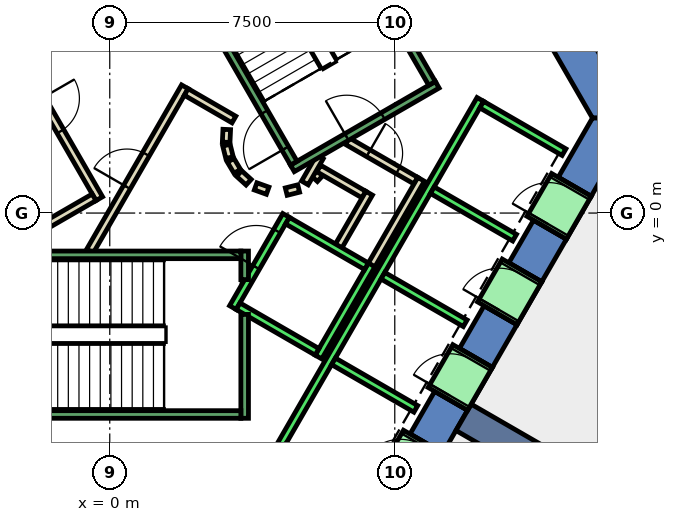
"""IFC4 building model, lengths in metres.
Left out: names, types, materials, properties, quantities, classifications, styles, units other than length and angle.
Written with IfcOpenShell. Run it as: python <this file> out.ifc"""

import sys

from ifc_helpers import new_model, si_unit, direction, frame, frame_2d, origin, place, context, subcontext, project, spatial, polyline, rectangle, outline, extrude, element, fill, save


model = new_model("IFC4")
c1 = context("Model", 3, precision=1e-05, world=origin(), true_north=direction((0.0, 1.0)))
c2 = subcontext(c1, "Body", "Model", "MODEL_VIEW")
j1 = project(units=[si_unit("LENGTHUNIT", "METRE"), si_unit("PLANEANGLEUNIT", "RADIAN")], contexts=[c1])
p1 = place(None, origin())
s1 = spatial("IfcSite", under=j1, at=p1, CompositionType="ELEMENT")
p2 = place(p1, origin())
s2 = spatial("IfcBuilding", under=s1, at=p2, CompositionType="ELEMENT")
p3 = place(p2, frame((0.0, 0.0, 64.4)))
s3 = spatial("IfcBuildingStorey", under=s2, at=p3, CompositionType="ELEMENT", Elevation=64.4)
p4 = place(p3, frame((0.0, 0.0, -0.4)))
e1 = element("IfcWall", 1, at=p4, inside=s3, PredefinedType="SHEAR", context=c2, shape_type="SweptSolid", body=[
    extrude(outline(polyline([(8.517, 11.748), (7.651, 11.248), (12.702, 2.5), (13.856, 2.5), (8.517, 11.748)])), origin(), (0.0, 0.0, 1.0), 4.2),
])
p5 = place(p3, frame((0.0, 0.0, -0.4)))
e2 = element("IfcWall", 2, at=p5, inside=s3, PredefinedType="SHEAR", context=c2, shape_type="SweptSolid", body=[
    extrude(outline(polyline([(9.417, -5.189), (8.551, -4.689), (7.902, -5.814), (8.767, -6.314), (9.417, -5.189)])), origin(), (0.0, 0.0, 1.0), 4.2),
])
p6 = place(p3, frame((0.0, 0.0, -0.4)))
e3 = element("IfcWall", 3, at=p6, inside=s3, PredefinedType="SHEAR", context=c2, shape_type="SweptSolid", body=[
    extrude(outline(polyline([(10.717, -2.937), (9.851, -2.437), (9.201, -3.563), (10.067, -4.063), (10.717, -2.937)])), origin(), (0.0, 0.0, 1.0), 4.2),
])
p7 = place(p3, frame((0.0, 0.0, -0.4)))
e4 = element("IfcWall", 4, at=p7, inside=s3, PredefinedType="SHEAR", context=c2, shape_type="SweptSolid", body=[
    extrude(outline(polyline([(12.017, -0.686), (11.151, -0.186), (10.501, -1.311), (11.367, -1.811), (12.017, -0.686)])), origin(), (0.0, 0.0, 1.0), 4.2),
])
p8 = place(p3, frame((0.0, 0.0, -0.4)))
e5 = element("IfcWall", 5, at=p8, inside=s3, PredefinedType="SHEAR", context=c2, shape_type="SweptSolid", body=[
    extrude(outline(polyline([(11.801, 0.94), (12.667, 0.44), (13.856, 2.5), (12.702, 2.5), (11.801, 0.94)])), origin(), (0.0, 0.0, 1.0), 4.2),
])
p9 = place(p3, frame((0.0, 0.0, 3.6)))
e6 = element("IfcWall", 6, at=p9, inside=s3, PredefinedType="SHEAR", context=c2, shape_type="SweptSolid", body=[
    extrude(outline(polyline([(8.767, -6.314), (7.902, -5.814), (7.252, -6.94), (8.117, -7.44), (8.767, -6.314)])), origin(), (0.0, 0.0, 1.0), 0.2),
])
p10 = place(p3, frame((0.0, 0.0, 3.6)))
e7 = element("IfcWall", 7, at=p10, inside=s3, PredefinedType="SHEAR", context=c2, shape_type="SweptSolid", body=[
    extrude(outline(polyline([(10.067, -4.063), (9.201, -3.563), (8.551, -4.689), (9.417, -5.189), (10.067, -4.063)])), origin(), (0.0, 0.0, 1.0), 0.2),
])
p11 = place(p3, frame((0.0, 0.0, 3.6)))
e8 = element("IfcWall", 8, at=p11, inside=s3, PredefinedType="SHEAR", context=c2, shape_type="SweptSolid", body=[
    extrude(outline(polyline([(11.367, -1.811), (10.501, -1.311), (9.851, -2.437), (10.717, -2.937), (11.367, -1.811)])), origin(), (0.0, 0.0, 1.0), 0.2),
])
p12 = place(p3, frame((0.0, 0.0, 3.6)))
e9 = element("IfcWall", 9, at=p12, inside=s3, PredefinedType="SHEAR", context=c2, shape_type="SweptSolid", body=[
    extrude(outline(polyline([(12.667, 0.44), (11.801, 0.94), (11.151, -0.186), (12.017, -0.686), (12.667, 0.44)])), origin(), (0.0, 0.0, 1.0), 0.2),
])
p13 = place(p3, frame((9.31, -5.375, -0.4), z_axis=(0.0, 0.0, 1.0), x_axis=(0.866017533419, -0.500013631625, 0.0)))
e10 = element("IfcWall", 10, at=p13, inside=s3, PredefinedType="SHEAR", context=c2, shape_type="SweptSolid", body=[
    extrude(rectangle(XDim=9.0, YDim=0.8, at=frame_2d((4.5, 0.0))), origin(), (0.0, 0.0, 1.0), 4.2),
])
p14 = place(p3, frame((5.39, 0.898, 0.0), z_axis=(0.0, 0.0, 1.0), x_axis=(0.673828488714, 0.738887791073, 0.0)))
e11 = element("IfcWall", 11, at=p14, inside=s3, PredefinedType="PARTITIONING", context=c2, shape_type="SweptSolid", body=[
    extrude(rectangle(XDim=0.263, YDim=0.2, at=frame_2d((0.131, 0.0))), origin(), (0.0, 0.0, 1.0), 3.8),
])
p15 = place(p3, frame((5.499, 1.172, 0.0), z_axis=(0.0, 0.0, 1.0), x_axis=(0.866333505267, -0.499465972466, 0.0)))
e12 = element("IfcWall", 12, at=p15, inside=s3, PredefinedType="PARTITIONING", context=c2, shape_type="SweptSolid", body=[
    extrude(rectangle(XDim=1.374, YDim=0.2, at=frame_2d((0.687, 0.0))), origin(), (0.0, 0.0, 1.0), 3.8),
])
p16 = place(p3, frame((6.826, 0.522, 0.0), z_axis=(0.0, 0.0, 1.0), x_axis=(-0.500016722714, -0.866015748706, 0.0)))
e13 = element("IfcWall", 13, at=p16, inside=s3, PredefinedType="PARTITIONING", context=c2, shape_type="SweptSolid", body=[
    extrude(rectangle(XDim=1.7, YDim=0.2, at=frame_2d((0.85, 0.0))), origin(), (0.0, 0.0, 1.0), 3.8),
])
p17 = place(p3, frame((6.25, 1.894, 0.0), z_axis=(0.0, 0.0, 1.0), x_axis=(0.866043184279, -0.499969202016, 0.0)))
e14 = element("IfcWall", 14, at=p17, inside=s3, PredefinedType="PARTITIONING", context=c2, shape_type="SweptSolid", body=[
    extrude(rectangle(XDim=2.084, YDim=0.2, at=frame_2d((1.042, 0.0))), origin(), (0.0, 0.0, 1.0), 3.8),
])
p18 = place(p17, frame((0.642, 0.0, 0.0)))
e15 = element("IfcOpeningElement", 15, at=p18, cuts=e14, PredefinedType="OPENING", context=c2, shape_type="SweptSolid", body=[
    extrude(rectangle(XDim=0.9, YDim=2.1, at=frame_2d((0.45, 1.05))), frame((0.0, 0.11, 0.0), z_axis=(0.0, -1.0, 0.0), x_axis=(1.0, 0.0, 0.0)), (0.0, 0.0, 1.0), 0.22),
])
p19 = place(p3, frame((8.192, 0.888, 0.0), z_axis=(0.0, 0.0, 1.0), x_axis=(-0.499940625693, -0.866059680843, 0.0)))
e16 = element("IfcWall", 16, at=p19, inside=s3, PredefinedType="PARTITIONING", context=c2, shape_type="SweptSolid", body=[
    extrude(rectangle(XDim=2.68, YDim=0.2, at=frame_2d((1.34, 0.0))), origin(), (0.0, 0.0, 1.0), 3.8),
])
p20 = place(p3, frame((5.135, 0.793, 0.0), z_axis=(0.0, 0.0, 1.0), x_axis=(0.499526442893, 0.866298639529, 0.0)))
e17 = element("IfcWall", 17, at=p20, inside=s3, PredefinedType="PARTITIONING", context=c2, shape_type="SweptSolid", body=[
    extrude(rectangle(XDim=0.791, YDim=0.2, at=frame_2d((0.396, 0.0))), origin(), (0.0, 0.0, 1.0), 3.8),
])
p21 = place(p3, frame((-0.52, -1.0, 0.0), z_axis=(0.0, 0.0, 1.0), x_axis=(0.50011622646, 0.865958290007, 0.0)))
e18 = element("IfcWall", 18, at=p21, inside=s3, PredefinedType="PARTITIONING", context=c2, shape_type="SweptSolid", body=[
    extrude(rectangle(XDim=4.991, YDim=0.2, at=frame_2d((2.496, 0.0))), origin(), (0.0, 0.0, 1.0), 3.8),
])
p22 = place(p21, frame((1.945, 0.0, 0.0)))
e19 = element("IfcOpeningElement", 19, at=p22, cuts=e18, PredefinedType="OPENING", context=c2, shape_type="SweptSolid", body=[
    extrude(rectangle(XDim=1.0, YDim=2.1, at=frame_2d((0.5, 1.05))), frame((0.0, 0.11, 0.0), z_axis=(0.0, -1.0, 0.0), x_axis=(1.0, 0.0, 0.0)), (0.0, 0.0, 1.0), 0.22),
])
p23 = place(p3, frame((2.012, 3.186, 0.0), z_axis=(0.0, 0.0, 1.0), x_axis=(0.865891012941, -0.500232699559, 0.0)))
e20 = element("IfcWall", 20, at=p23, inside=s3, PredefinedType="PARTITIONING", context=c2, shape_type="SweptSolid", body=[
    extrude(rectangle(XDim=1.449, YDim=0.2, at=frame_2d((0.725, 0.0))), origin(), (0.0, 0.0, 1.0), 3.8),
])
p24 = place(p3, frame((3.079, 2.199, 0.0), z_axis=(0.0, 0.0, 1.0), x_axis=(-0.047771483479, -0.998858290933, 0.0)))
e21 = element("IfcWall", 21, at=p24, inside=s3, PredefinedType="PARTITIONING", context=c2, shape_type="SweptSolid", body=[
    extrude(rectangle(XDim=0.337, YDim=0.2, at=frame_2d((0.169, 0.0))), origin(), (0.0, 0.0, 1.0), 3.8),
])
p25 = place(p3, frame((3.07, 1.786, 0.0), z_axis=(0.0, 0.0, 1.0), x_axis=(0.242705583207, -0.970099994784, 0.0)))
e22 = element("IfcWall", 22, at=p25, inside=s3, PredefinedType="PARTITIONING", context=c2, shape_type="SweptSolid", body=[
    extrude(rectangle(XDim=0.338, YDim=0.2, at=frame_2d((0.169, 0.0))), origin(), (0.0, 0.0, 1.0), 3.8),
])
for number, where, z_axis, x_axis in (
    (23, (3.182, 1.388, 0.0), (0.0, 0.0, 1.0), (0.512, -0.859, 0.0)),
    (24, (3.404, 1.039, 0.0), (0.0, 0.0, 1.0), (0.74, -0.672, 0.0)),
):
    element("IfcWall", number, at=place(p3, frame(where, z_axis=z_axis, x_axis=x_axis)), inside=s3, PredefinedType="PARTITIONING", context=c2, shape_type="SweptSolid", body=[
        extrude(rectangle(XDim=0.338, YDim=0.2, at=frame_2d((0.169, 0.0))), origin(), (0.0, 0.0, 1.0), 3.8),
    ])
p26 = place(p3, frame((3.838, 0.702, 0.0), z_axis=(0.0, 0.0, 1.0), x_axis=(0.941035081519, -0.338308993895, 0.0)))
e25 = element("IfcWall", 25, at=p26, inside=s3, PredefinedType="PARTITIONING", context=c2, shape_type="SweptSolid", body=[
    extrude(rectangle(XDim=0.337, YDim=0.2, at=frame_2d((0.168, 0.0))), origin(), (0.0, 0.0, 1.0), 3.8),
])
p27 = place(p3, frame((4.644, 0.564, 0.0), z_axis=(0.0, 0.0, 1.0), x_axis=(0.969929076366, 0.243387729394, 0.0)))
e26 = element("IfcWall", 26, at=p27, inside=s3, PredefinedType="PARTITIONING", context=c2, shape_type="SweptSolid", body=[
    extrude(rectangle(XDim=0.337, YDim=0.2, at=frame_2d((0.168, 0.0))), origin(), (0.0, 0.0, 1.0), 3.8),
])
p28 = place(p3, frame((-2.771, 4.7, 0.0), z_axis=(0.0, 0.0, 1.0), x_axis=(0.499969479948, -0.866043023828, 0.0)))
e27 = element("IfcWall", 27, at=p28, inside=s3, PredefinedType="PARTITIONING", context=c2, shape_type="SweptSolid", body=[
    extrude(rectangle(XDim=4.99, YDim=0.2, at=frame_2d((2.495, 0.0))), origin(), (0.0, 0.0, 1.0), 3.8),
])
p29 = place(p28, frame((1.945, 0.0, 0.0)))
e28 = element("IfcOpeningElement", 28, at=p29, cuts=e27, PredefinedType="OPENING", context=c2, shape_type="SweptSolid", body=[
    extrude(rectangle(XDim=1.0, YDim=2.1, at=frame_2d((0.5, 1.05))), frame((0.0, 0.11, 0.0), z_axis=(0.0, -1.0, 0.0), x_axis=(1.0, 0.0, 0.0)), (0.0, 0.0, 1.0), 0.22),
])
p30 = place(p3, frame((-0.412, 0.414, 0.0), z_axis=(0.0, 0.0, 1.0), x_axis=(-0.866017369001, -0.500013916395, 0.0)))
e29 = element("IfcWall", 29, at=p30, inside=s3, PredefinedType="PARTITIONING", context=c2, shape_type="SweptSolid", body=[
    extrude(rectangle(XDim=1.45, YDim=0.2, at=frame_2d((0.725, 0.0))), origin(), (0.0, 0.0, 1.0), 3.8),
])
p31 = place(p3, frame((19.81, 5.211, 0.0), z_axis=(0.0, 0.0, 1.0), x_axis=(-0.500003368273, -0.866023459102, 0.0)))
e30 = element("IfcWall", 30, at=p31, inside=s3, PredefinedType="PARTITIONING", context=c2, shape_type="SweptSolid", body=[
    extrude(rectangle(XDim=14.018, YDim=0.2, at=frame_2d((7.009, 0.0))), origin(), (0.0, 0.0, 1.0), 3.8),
])
p32 = place(p3, frame((3.24, -2.488, 0.0), z_axis=(0.0, 0.0, 1.0), x_axis=(0.49994636267, 0.866056369097, 0.0)))
e31 = element("IfcWall", 31, at=p32, inside=s3, PredefinedType="STANDARD", context=c2, shape_type="SweptSolid", body=[
    extrude(rectangle(XDim=2.8, YDim=0.2, at=frame_2d((1.4, 0.0))), origin(), (0.0, 0.0, 1.0), 3.8),
])
p33 = place(p32, frame((1.225, 0.0, 0.0)))
e32 = element("IfcOpeningElement", 32, at=p33, cuts=e31, PredefinedType="OPENING", context=c2, shape_type="SweptSolid", body=[
    extrude(rectangle(XDim=1.1, YDim=2.1, at=frame_2d((0.55, 1.05))), frame((0.0, 0.11, 0.0), z_axis=(0.0, -1.0, 0.0), x_axis=(1.0, 0.0, 0.0)), (0.0, 0.0, 1.0), 0.22),
])
p34 = place(p3, frame((5.492, -3.788, 0.0), z_axis=(0.0, 0.0, 1.0), x_axis=(0.500011755427, 0.866018616679, 0.0)))
e33 = element("IfcWall", 33, at=p34, inside=s3, PredefinedType="STANDARD", context=c2, shape_type="SweptSolid", body=[
    extrude(rectangle(XDim=2.8, YDim=0.2, at=frame_2d((1.4, 0.0))), origin(), (0.0, 0.0, 1.0), 3.8),
])
p35 = place(p3, frame((3.377, -2.452, 0.0), z_axis=(0.0, 0.0, 1.0), x_axis=(0.865955154139, -0.50012165622, 0.0)))
e34 = element("IfcWall", 34, at=p35, inside=s3, PredefinedType="STANDARD", context=c2, shape_type="SweptSolid", body=[
    extrude(rectangle(XDim=2.4, YDim=0.2, at=frame_2d((1.2, 0.0))), origin(), (0.0, 0.0, 1.0), 3.8),
])
p36 = place(p3, frame((4.677, -0.2, 0.0), z_axis=(0.0, 0.0, 1.0), x_axis=(0.865973769406, -0.500089422704, 0.0)))
e35 = element("IfcWall", 35, at=p36, inside=s3, PredefinedType="STANDARD", context=c2, shape_type="SweptSolid", body=[
    extrude(rectangle(XDim=2.399, YDim=0.2, at=frame_2d((1.2, 0.0))), origin(), (0.0, 0.0, 1.0), 3.8),
])
p37 = place(p3, frame((4.451, -6.19, 0.0), z_axis=(0.0, 0.0, 1.0), x_axis=(0.50000090737, 0.866024879913, 0.0)))
e36 = element("IfcWall", 36, at=p37, inside=s3, PredefinedType="STANDARD", context=c2, shape_type="SweptSolid", body=[
    extrude(rectangle(XDim=10.6, YDim=0.2, at=frame_2d((5.3, 0.0))), origin(), (0.0, 0.0, 1.0), 3.8),
])
for number, where, z_axis, x_axis in (
    (37, (5.888, -3.902, 0.0), (0.0, 0.0, 1.0), (0.866, -0.5, 0.0)),
    (38, (7.188, -1.65, 0.0), (0.0, 0.0, 1.0), (0.866, -0.5, 0.0)),
    (39, (8.488, 0.602, 0.0), (0.0, 0.0, 1.0), (0.866, -0.5, 0.0)),
):
    element("IfcWall", number, at=place(p3, frame(where, z_axis=z_axis, x_axis=x_axis)), inside=s3, PredefinedType="STANDARD", context=c2, shape_type="SweptSolid", body=[
        extrude(rectangle(XDim=2.5, YDim=0.2, at=frame_2d((1.25, 0.0))), origin(), (0.0, 0.0, 1.0), 3.8),
    ])
p38 = place(p3, frame((9.788, 2.853, 0.0), z_axis=(0.0, 0.0, 1.0), x_axis=(0.865998541277, -0.500046524342, 0.0)))
e40 = element("IfcWall", 40, at=p38, inside=s3, PredefinedType="STANDARD", context=c2, shape_type="SweptSolid", body=[
    extrude(rectangle(XDim=2.5, YDim=0.2, at=frame_2d((1.25, 0.0))), origin(), (0.0, 0.0, 1.0), 3.8),
])
p39 = place(p3, frame((7.598, -7.14, 0.0), z_axis=(0.0, 0.0, 1.0), x_axis=(0.500362116554, 0.865816234728, 0.0)))
e41 = element("IfcWall", 41, at=p39, inside=s3, PredefinedType="STANDARD", context=c2, shape_type="SweptSolid", body=[
    extrude(rectangle(XDim=1.299, YDim=1.2, at=frame_2d((0.65, 0.0))), origin(), (0.0, 0.0, 1.0), 2.4),
])
p40 = place(p39, frame((0.1, 0.0, 0.0)))
e42 = element("IfcOpeningElement", 42, at=p40, cuts=e41, PredefinedType="OPENING", context=c2, shape_type="SweptSolid", body=[
    extrude(rectangle(XDim=1.1, YDim=2.3, at=frame_2d((0.55, 1.15))), frame((0.0, 0.61, 0.0), z_axis=(0.0, -1.0, 0.0), x_axis=(1.0, 0.0, 0.0)), (0.0, 0.0, 1.0), 1.22),
])
p41 = place(p3, frame((8.898, -4.889, 0.0), z_axis=(0.0, 0.0, 1.0), x_axis=(0.500036693733, 0.866004217611, 0.0)))
e43 = element("IfcWall", 43, at=p41, inside=s3, PredefinedType="STANDARD", context=c2, shape_type="SweptSolid", body=[
    extrude(rectangle(XDim=1.3, YDim=1.2, at=frame_2d((0.65, 0.0))), origin(), (0.0, 0.0, 1.0), 2.4),
])
p42 = place(p41, frame((0.1, 0.0, 0.0)))
e44 = element("IfcOpeningElement", 44, at=p42, cuts=e43, PredefinedType="OPENING", context=c2, shape_type="SweptSolid", body=[
    extrude(rectangle(XDim=1.1, YDim=2.3, at=frame_2d((0.55, 1.15))), frame((0.0, 0.61, 0.0), z_axis=(0.0, -1.0, 0.0), x_axis=(1.0, 0.0, 0.0)), (0.0, 0.0, 1.0), 1.22),
])
p43 = place(p3, frame((10.198, -2.637, 0.0), z_axis=(0.0, 0.0, 1.0), x_axis=(0.49989585183, 0.866085525409, 0.0)))
e45 = element("IfcWall", 45, at=p43, inside=s3, PredefinedType="STANDARD", context=c2, shape_type="SweptSolid", body=[
    extrude(rectangle(XDim=1.3, YDim=1.2, at=frame_2d((0.65, 0.0))), origin(), (0.0, 0.0, 1.0), 2.4),
])
p44 = place(p43, frame((0.1, 0.0, 0.0)))
e46 = element("IfcOpeningElement", 46, at=p44, cuts=e45, PredefinedType="OPENING", context=c2, shape_type="SweptSolid", body=[
    extrude(rectangle(XDim=1.1, YDim=2.3, at=frame_2d((0.55, 1.15))), frame((0.0, 0.61, 0.0), z_axis=(0.0, -1.0, 0.0), x_axis=(1.0, 0.0, 0.0)), (0.0, 0.0, 1.0), 1.22),
])
p45 = place(p3, frame((11.498, -0.385, 0.0), z_axis=(0.0, 0.0, 1.0), x_axis=(0.500221244143, 0.865897630733, 0.0)))
e47 = element("IfcWall", 47, at=p45, inside=s3, PredefinedType="STANDARD", context=c2, shape_type="SweptSolid", body=[
    extrude(rectangle(XDim=1.299, YDim=1.2, at=frame_2d((0.65, 0.0))), origin(), (0.0, 0.0, 1.0), 2.4),
])
p46 = place(p45, frame((0.1, 0.0, 0.0)))
e48 = element("IfcOpeningElement", 48, at=p46, cuts=e47, PredefinedType="OPENING", context=c2, shape_type="SweptSolid", body=[
    extrude(rectangle(XDim=1.1, YDim=2.3, at=frame_2d((0.55, 1.15))), frame((0.0, 0.61, 0.0), z_axis=(0.0, -1.0, 0.0), x_axis=(1.0, 0.0, 0.0)), (0.0, 0.0, 1.0), 1.22),
])
p47 = place(p3, frame((3.55, -2.667, 0.0), z_axis=(0.0, 0.0, 1.0), x_axis=(0.0, -1.0, 0.0)))
e49 = element("IfcWall", 49, at=p47, inside=s3, PredefinedType="STANDARD", context=c2, shape_type="SweptSolid", body=[
    extrude(rectangle(XDim=2.733, YDim=0.2, at=frame_2d((1.366, 0.0))), origin(), (0.0, 0.0, 1.0), 3.8),
])
p48 = place(p3, frame((3.55, -1.0, 0.0), z_axis=(0.0, 0.0, 1.0), x_axis=(0.0, -1.0, 0.0)))
e50 = element("IfcWall", 50, at=p48, inside=s3, PredefinedType="STANDARD", context=c2, shape_type="SweptSolid", body=[
    extrude(rectangle(XDim=0.751, YDim=0.2, at=frame_2d((0.375, 0.0))), origin(), (0.0, 0.0, 1.0), 3.8),
])
p49 = place(p3, frame((-3.45, -1.1, 0.0), z_axis=(0.0, 0.0, 1.0), x_axis=(1.0, 0.0, 0.0)))
e51 = element("IfcWall", 51, at=p49, inside=s3, PredefinedType="STANDARD", context=c2, shape_type="SweptSolid", body=[
    extrude(rectangle(XDim=6.9, YDim=0.2, at=frame_2d((3.45, 0.0))), origin(), (0.0, 0.0, 1.0), 3.8),
])
p50 = place(p49, frame((0.45, 0.0, 0.0)))
e52 = element("IfcOpeningElement", 52, at=p50, cuts=e51, PredefinedType="OPENING", context=c2, shape_type="SweptSolid", body=[
    extrude(rectangle(XDim=1.1, YDim=2.2, at=frame_2d((0.55, 1.1))), frame((0.0, 0.11, 0.0), z_axis=(0.0, -1.0, 0.0), x_axis=(1.0, 0.0, 0.0)), (0.0, 0.0, 1.0), 0.22),
])
p51 = place(p3, frame((-3.45, -5.3, 0.0), z_axis=(0.0, 0.0, 1.0), x_axis=(1.0, 0.0, 0.0)))
e53 = element("IfcWall", 53, at=p51, inside=s3, PredefinedType="STANDARD", context=c2, shape_type="SweptSolid", body=[
    extrude(rectangle(XDim=6.9, YDim=0.2, at=frame_2d((3.45, 0.0))), origin(), (0.0, 0.0, 1.0), 3.8),
])
p52 = place(p3, frame((4.806, 1.176, 0.0), z_axis=(0.0, 0.0, 1.0), x_axis=(0.866059941101, 0.499940174841, 0.0)))
e54 = element("IfcWall", 54, at=p52, inside=s3, PredefinedType="STANDARD", context=c2, shape_type="SweptSolid", body=[
    extrude(rectangle(XDim=4.4, YDim=0.2, at=frame_2d((2.2, 0.0))), origin(), (0.0, 0.0, 1.0), 3.8),
])
p53 = place(p52, frame((1.65, 0.0, 0.0)))
e55 = element("IfcOpeningElement", 55, at=p53, cuts=e54, PredefinedType="OPENING", context=c2, shape_type="SweptSolid", body=[
    extrude(rectangle(XDim=1.1, YDim=2.2, at=frame_2d((0.55, 1.1))), frame((0.0, 0.11, 0.0), z_axis=(0.0, -1.0, 0.0), x_axis=(1.0, 0.0, 0.0)), (0.0, 0.0, 1.0), 0.22),
])
p54 = place(p3, frame((4.843, 1.312, 0.0), z_axis=(0.0, 0.0, 1.0), x_axis=(-0.499963383562, 0.866046543262, 0.0)))
e56 = element("IfcWall", 56, at=p54, inside=s3, PredefinedType="STANDARD", context=c2, shape_type="SweptSolid", body=[
    extrude(rectangle(XDim=6.9, YDim=0.2, at=frame_2d((3.45, 0.0))), origin(), (0.0, 0.0, 1.0), 3.8),
])
p55 = place(p54, frame((0.45, 0.0, 0.0)))
e57 = element("IfcOpeningElement", 57, at=p55, cuts=e56, PredefinedType="OPENING", context=c2, shape_type="SweptSolid", body=[
    extrude(rectangle(XDim=1.1, YDim=2.2, at=frame_2d((0.55, 1.1))), frame((0.0, 0.11, 0.0), z_axis=(0.0, -1.0, 0.0), x_axis=(1.0, 0.0, 0.0)), (0.0, 0.0, 1.0), 0.22),
])
p56 = place(p3, frame((8.48, 3.412, 0.0), z_axis=(0.0, 0.0, 1.0), x_axis=(-0.499978703459, 0.866037698999, 0.0)))
e58 = element("IfcWall", 58, at=p56, inside=s3, PredefinedType="STANDARD", context=c2, shape_type="SweptSolid", body=[
    extrude(rectangle(XDim=6.9, YDim=0.2, at=frame_2d((3.45, 0.0))), origin(), (0.0, 0.0, 1.0), 3.8),
])
p57 = place(p3, frame((-1.393, 7.288, 0.0), z_axis=(0.0, 0.0, 1.0), x_axis=(-0.499963383562, -0.866046543262, 0.0)))
e59 = element("IfcWall", 59, at=p57, inside=s3, PredefinedType="STANDARD", context=c2, shape_type="SweptSolid", body=[
    extrude(rectangle(XDim=6.9, YDim=0.2, at=frame_2d((3.45, 0.0))), origin(), (0.0, 0.0, 1.0), 3.8),
])
p58 = place(p57, frame((0.45, 0.0, 0.0)))
e60 = element("IfcOpeningElement", 60, at=p58, cuts=e59, PredefinedType="OPENING", context=c2, shape_type="SweptSolid", body=[
    extrude(rectangle(XDim=1.1, YDim=2.2, at=frame_2d((0.55, 1.1))), frame((0.0, 0.11, 0.0), z_axis=(0.0, -1.0, 0.0), x_axis=(1.0, 0.0, 0.0)), (0.0, 0.0, 1.0), 0.22),
])
p59 = place(p22, origin())
e61 = element("IfcDoor", 61, at=p59, inside=s3, OperationType="SINGLE_SWING_LEFT", PredefinedType="DOOR", context=c2, shape_type="SweptSolid", body=[
    extrude(rectangle(XDim=1.0, YDim=2.1, at=frame_2d((0.5, 1.05))), frame((0.0, 0.025, 0.0), z_axis=(0.0, -1.0, 0.0), x_axis=(1.0, 0.0, 0.0)), (0.0, 0.0, 1.0), 0.05),
])
fill(e19, e61)
p60 = place(p29, origin())
e62 = element("IfcDoor", 62, at=p60, inside=s3, OperationType="SINGLE_SWING_RIGHT", PredefinedType="DOOR", context=c2, shape_type="SweptSolid", body=[
    extrude(rectangle(XDim=1.0, YDim=2.1, at=frame_2d((0.5, 1.05))), frame((0.0, 0.025, 0.0), z_axis=(0.0, -1.0, 0.0), x_axis=(1.0, 0.0, 0.0)), (0.0, 0.0, 1.0), 0.05),
])
fill(e28, e62)
p61 = place(p18, origin())
e63 = element("IfcDoor", 63, at=p61, inside=s3, OperationType="SINGLE_SWING_LEFT", PredefinedType="DOOR", context=c2, shape_type="SweptSolid", body=[
    extrude(rectangle(XDim=0.9, YDim=2.1, at=frame_2d((0.45, 1.05))), frame((0.0, 0.025, 0.0), z_axis=(0.0, -1.0, 0.0), x_axis=(1.0, 0.0, 0.0)), (0.0, 0.0, 1.0), 0.05),
])
fill(e15, e63)
p62 = place(p42, origin())
e64 = element("IfcDoor", 64, at=p62, inside=s3, OperationType="SLIDING_TO_LEFT", PredefinedType="DOOR", context=c2, shape_type="SweptSolid", body=[
    extrude(rectangle(XDim=1.1, YDim=2.3, at=frame_2d((0.55, 1.15))), frame((0.0, 0.025, 0.0), z_axis=(0.0, -1.0, 0.0), x_axis=(1.0, 0.0, 0.0)), (0.0, 0.0, 1.0), 0.05),
])
fill(e44, e64)
p63 = place(p44, origin())
e65 = element("IfcDoor", 65, at=p63, inside=s3, OperationType="SLIDING_TO_LEFT", PredefinedType="DOOR", context=c2, shape_type="SweptSolid", body=[
    extrude(rectangle(XDim=1.1, YDim=2.3, at=frame_2d((0.55, 1.15))), frame((0.0, 0.025, 0.0), z_axis=(0.0, -1.0, 0.0), x_axis=(1.0, 0.0, 0.0)), (0.0, 0.0, 1.0), 0.05),
])
fill(e46, e65)
p64 = place(p46, origin())
e66 = element("IfcDoor", 66, at=p64, inside=s3, OperationType="SLIDING_TO_LEFT", PredefinedType="DOOR", context=c2, shape_type="SweptSolid", body=[
    extrude(rectangle(XDim=1.1, YDim=2.3, at=frame_2d((0.55, 1.15))), frame((0.0, 0.025, 0.0), z_axis=(0.0, -1.0, 0.0), x_axis=(1.0, 0.0, 0.0)), (0.0, 0.0, 1.0), 0.05),
])
fill(e48, e66)
p65 = place(p33, origin())
e67 = element("IfcDoor", 67, at=p65, inside=s3, OperationType="SLIDING_TO_LEFT", PredefinedType="DOOR", context=c2, shape_type="SweptSolid", body=[
    extrude(rectangle(XDim=1.1, YDim=2.1, at=frame_2d((0.55, 1.05))), frame((0.0, 0.025, 0.0), z_axis=(0.0, -1.0, 0.0), x_axis=(1.0, 0.0, 0.0)), (0.0, 0.0, 1.0), 0.05),
])
fill(e32, e67)
p66 = place(p55, origin())
e68 = element("IfcDoor", 68, at=p66, inside=s3, OperationType="SINGLE_SWING_LEFT", PredefinedType="DOOR", context=c2, shape_type="SweptSolid", body=[
    extrude(rectangle(XDim=1.1, YDim=2.2, at=frame_2d((0.55, 1.1))), frame((0.0, 0.025, 0.0), z_axis=(0.0, -1.0, 0.0), x_axis=(1.0, 0.0, 0.0)), (0.0, 0.0, 1.0), 0.05),
])
fill(e57, e68)
p67 = place(p53, origin())
e69 = element("IfcDoor", 69, at=p67, inside=s3, OperationType="SINGLE_SWING_LEFT", PredefinedType="DOOR", context=c2, shape_type="SweptSolid", body=[
    extrude(rectangle(XDim=1.1, YDim=2.2, at=frame_2d((0.55, 1.1))), frame((0.0, 0.025, 0.0), z_axis=(0.0, -1.0, 0.0), x_axis=(1.0, 0.0, 0.0)), (0.0, 0.0, 1.0), 0.05),
])
fill(e55, e69)
save(model, sys.argv[1])
